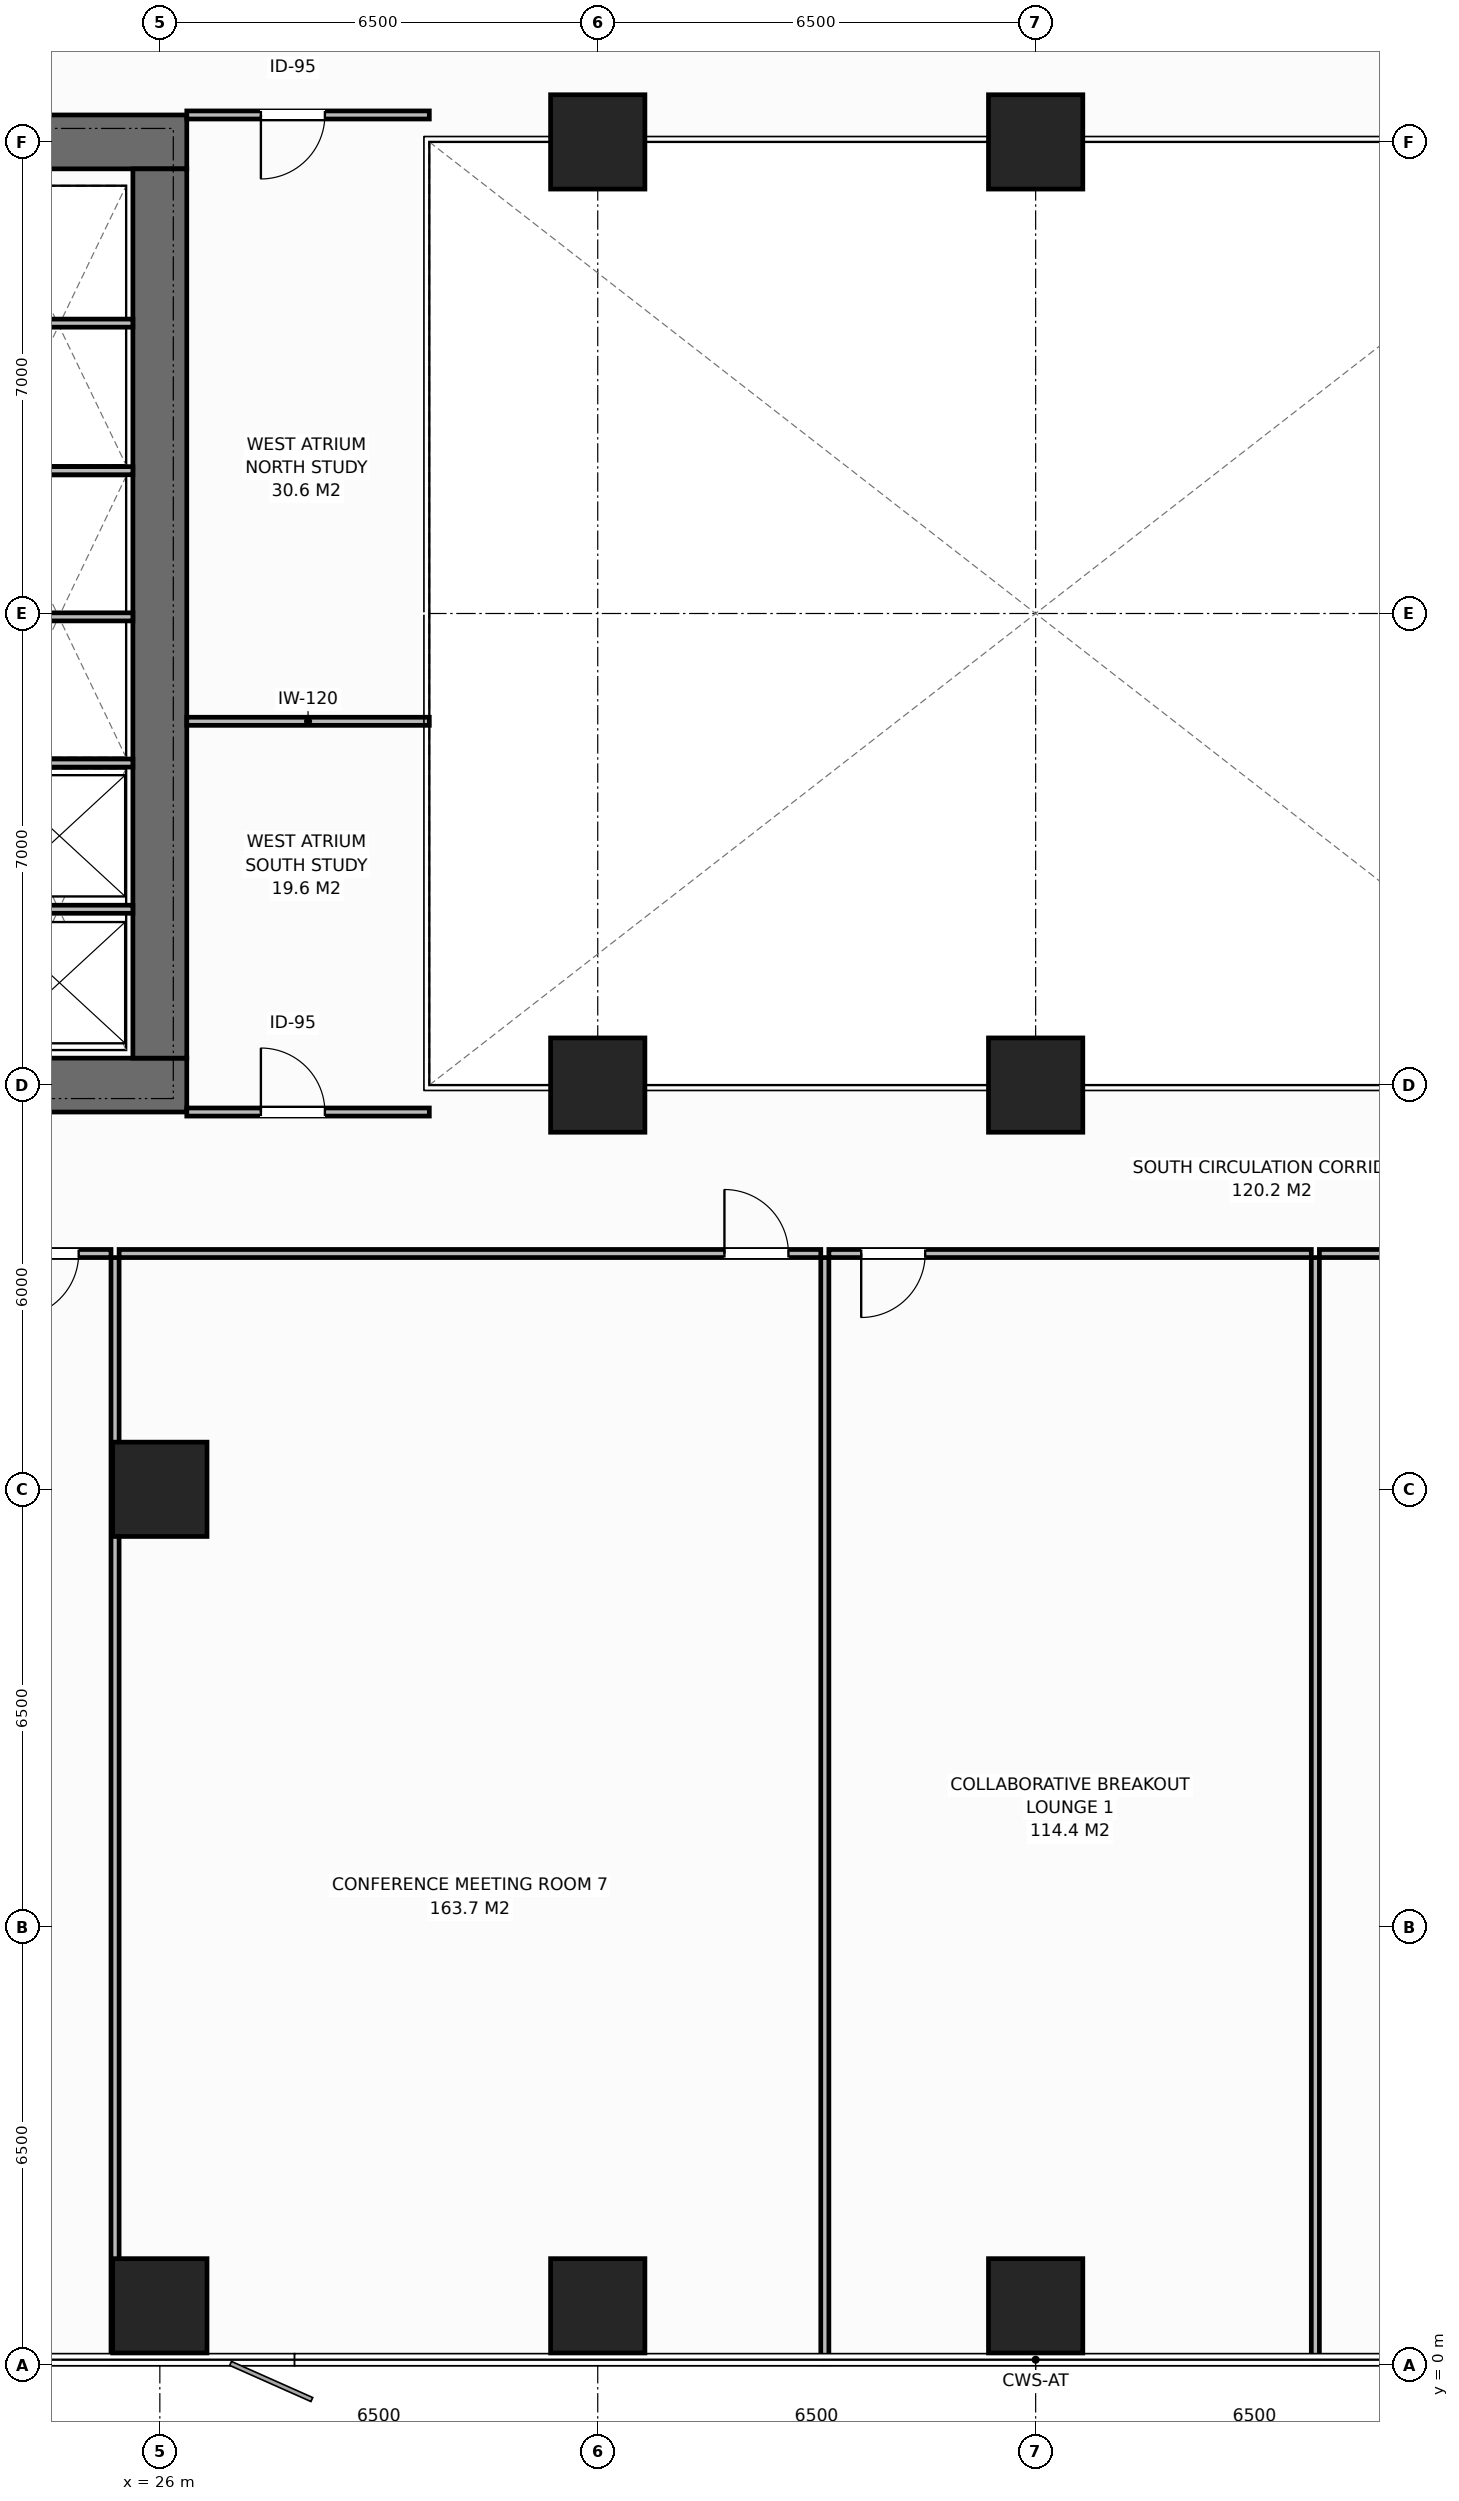
"""IFC4 building model, lengths in metres.
Left out: names, types, materials, properties, quantities, classifications, styles, units other than length and angle.
Written with IfcOpenShell. Run it as: python <this file> out.ifc"""

import sys

from ifc_helpers import new_model, si_unit, direction, frame, frame_2d, origin, origin_2d, place, context, subcontext, project, spatial, rectangle, extrude, element, fill, save


model = new_model("IFC4")
c1 = context("Model", 3, precision=1e-05, world=origin(), true_north=direction((0.0, 1.0)))
c2 = subcontext(c1, "Body", "Model", "MODEL_VIEW")
j1 = project(units=[si_unit("LENGTHUNIT", "METRE"), si_unit("PLANEANGLEUNIT", "RADIAN")], contexts=[c1])
p1 = place(None, origin())
s1 = spatial("IfcSite", under=j1, at=p1, CompositionType="ELEMENT")
p2 = place(p1, origin())
s2 = spatial("IfcBuilding", under=s1, at=p2, CompositionType="ELEMENT")
p3 = place(p2, frame((0.0, 0.0, 77.2)))
s3 = spatial("IfcBuildingStorey", under=s2, at=p3, CompositionType="ELEMENT", Elevation=77.2)
p4 = place(p3, frame((12.6, 19.0, 0.0), z_axis=(0.0, 0.0, 1.0), x_axis=(1.0, 0.0, 0.0)))
e1 = element("IfcWall", 1, at=p4, inside=s3, PredefinedType="SHEAR", context=c2, shape_type="SweptSolid", body=[
    extrude(rectangle(XDim=13.8, YDim=0.8, at=frame_2d((6.9, 0.0))), origin(), (0.0, 0.0, 1.0), 3.8),
])
p5 = place(p4, frame((9.28, 0.0, 0.0)))
e2 = element("IfcOpeningElement", 2, at=p5, cuts=e1, PredefinedType="OPENING", context=c2, shape_type="SweptSolid", body=[
    extrude(rectangle(XDim=1.4, YDim=2.2, at=frame_2d((0.7, 1.1))), frame((0.0, 0.41, 0.0), z_axis=(0.0, -1.0, 0.0), x_axis=(1.0, 0.0, 0.0)), (0.0, 0.0, 1.0), 0.82),
])
p6 = place(p3, frame((12.6, 33.0, 0.0), z_axis=(0.0, 0.0, 1.0), x_axis=(1.0, 0.0, 0.0)))
e3 = element("IfcWall", 3, at=p6, inside=s3, PredefinedType="SHEAR", context=c2, shape_type="SweptSolid", body=[
    extrude(rectangle(XDim=13.8, YDim=0.8, at=frame_2d((6.9, 0.0))), origin(), (0.0, 0.0, 1.0), 3.8),
])
p7 = place(p6, frame((1.3, 0.0, 0.0)))
e4 = element("IfcOpeningElement", 4, at=p7, cuts=e3, PredefinedType="OPENING", context=c2, shape_type="SweptSolid", body=[
    extrude(rectangle(XDim=0.9, YDim=2.15, at=frame_2d((0.45, 1.075))), frame((0.0, 0.41, 0.0), z_axis=(0.0, -1.0, 0.0), x_axis=(1.0, 0.0, 0.0)), (0.0, 0.0, 1.0), 0.82),
])
p8 = place(p6, frame((3.2, 0.0, 0.0)))
e5 = element("IfcOpeningElement", 5, at=p8, cuts=e3, PredefinedType="OPENING", context=c2, shape_type="SweptSolid", body=[
    extrude(rectangle(XDim=0.9, YDim=2.15, at=frame_2d((0.45, 1.075))), frame((0.0, 0.41, 0.0), z_axis=(0.0, -1.0, 0.0), x_axis=(1.0, 0.0, 0.0)), (0.0, 0.0, 1.0), 0.82),
])
p9 = place(p6, frame((5.0, 0.0, 0.0)))
e6 = element("IfcOpeningElement", 6, at=p9, cuts=e3, PredefinedType="OPENING", context=c2, shape_type="SweptSolid", body=[
    extrude(rectangle(XDim=0.9, YDim=2.15, at=frame_2d((0.45, 1.075))), frame((0.0, 0.41, 0.0), z_axis=(0.0, -1.0, 0.0), x_axis=(1.0, 0.0, 0.0)), (0.0, 0.0, 1.0), 0.82),
])
p10 = place(p6, frame((6.9, 0.0, 0.0)))
e7 = element("IfcOpeningElement", 7, at=p10, cuts=e3, PredefinedType="OPENING", context=c2, shape_type="SweptSolid", body=[
    extrude(rectangle(XDim=0.9, YDim=2.15, at=frame_2d((0.45, 1.075))), frame((0.0, 0.41, 0.0), z_axis=(0.0, -1.0, 0.0), x_axis=(1.0, 0.0, 0.0)), (0.0, 0.0, 1.0), 0.82),
])
p11 = place(p6, frame((9.28, 0.0, 0.0)))
e8 = element("IfcOpeningElement", 8, at=p11, cuts=e3, PredefinedType="OPENING", context=c2, shape_type="SweptSolid", body=[
    extrude(rectangle(XDim=1.4, YDim=2.2, at=frame_2d((0.7, 1.1))), frame((0.0, 0.41, 0.0), z_axis=(0.0, -1.0, 0.0), x_axis=(1.0, 0.0, 0.0)), (0.0, 0.0, 1.0), 0.82),
])
p12 = place(p3, frame((26.0, 19.4, 0.0), z_axis=(0.0, 0.0, 1.0), x_axis=(0.0, 1.0, 0.0)))
e9 = element("IfcWall", 9, at=p12, inside=s3, PredefinedType="SHEAR", context=c2, shape_type="SweptSolid", body=[
    extrude(rectangle(XDim=13.2, YDim=0.8, at=frame_2d((6.6, 0.0))), origin(), (0.0, 0.0, 1.0), 3.8),
])
for number, where, z_axis, x_axis in (
    (10, (32.5, 19.0, 0.0), (0.0, 0.0, 1.0), (1.0, 0.0, 0.0)),
    (11, (32.5, 33.0, 0.0), (0.0, 0.0, 1.0), (1.0, 0.0, 0.0)),
    (12, (39.0, 19.0, 0.0), (0.0, 0.0, 1.0), (1.0, 0.0, 0.0)),
    (13, (39.0, 33.0, 0.0), (0.0, 0.0, 1.0), (1.0, 0.0, 0.0)),
    (14, (26.0, 13.0, 0.0), (0.0, 0.0, 1.0), (1.0, 0.0, 0.0)),
    (15, (26.0, 0.88, 0.0), (0.0, 0.0, 1.0), (1.0, 0.0, 0.0)),
    (16, (32.5, 0.88, 0.0), (0.0, 0.0, 1.0), (1.0, 0.0, 0.0)),
    (17, (39.0, 0.88, 0.0), (0.0, 0.0, 1.0), (1.0, 0.0, 0.0)),
):
    element("IfcColumn", number, at=place(p3, frame(where, z_axis=z_axis, x_axis=x_axis)), inside=s3, PredefinedType="COLUMN", context=c2, shape_type="SweptSolid", body=[
        extrude(rectangle(XDim=1.4, YDim=1.4, at=origin_2d()), origin(), (0.0, 0.0, 1.0), 3.8),
    ])
for number, where, z_axis, x_axis in (
    (18, (23.4, 21.61, 0.0), (0.0, 0.0, 1.0), (1.0, 0.0, 0.0)),
    (19, (23.4, 23.78, 0.0), (0.0, 0.0, 1.0), (1.0, 0.0, 0.0)),
    (20, (23.4, 25.95, 0.0), (0.0, 0.0, 1.0), (1.0, 0.0, 0.0)),
    (21, (23.4, 28.12, 0.0), (0.0, 0.0, 1.0), (1.0, 0.0, 0.0)),
    (22, (23.4, 30.31, 0.0), (0.0, 0.0, 1.0), (1.0, 0.0, 0.0)),
):
    element("IfcWall", number, at=place(p3, frame(where, z_axis=z_axis, x_axis=x_axis)), inside=s3, PredefinedType="PARTITIONING", context=c2, shape_type="SweptSolid", body=[
        extrude(rectangle(XDim=2.2, YDim=0.12, at=frame_2d((1.1, 0.0))), origin(), (0.0, 0.0, 1.0), 3.52),
    ])
p13 = place(p3, frame((26.4, 24.4, 0.0), z_axis=(0.0, 0.0, 1.0), x_axis=(1.0, 0.0, 0.0)))
e23 = element("IfcWall", 23, at=p13, inside=s3, PredefinedType="PARTITIONING", context=c2, shape_type="SweptSolid", body=[
    extrude(rectangle(XDim=3.6, YDim=0.12, at=frame_2d((1.8, 0.0))), origin(), (0.0, 0.0, 1.0), 3.52),
])
p14 = place(p3, frame((26.4, 18.6, 0.0), z_axis=(0.0, 0.0, 1.0), x_axis=(1.0, 0.0, 0.0)))
e24 = element("IfcWall", 24, at=p14, inside=s3, PredefinedType="PARTITIONING", context=c2, shape_type="SweptSolid", body=[
    extrude(rectangle(XDim=3.6, YDim=0.12, at=frame_2d((1.8, 0.0))), origin(), (0.0, 0.0, 1.0), 3.52),
])
p15 = place(p14, frame((1.1, 0.0, 0.0)))
e25 = element("IfcOpeningElement", 25, at=p15, cuts=e24, PredefinedType="OPENING", context=c2, shape_type="SweptSolid", body=[
    extrude(rectangle(XDim=0.95, YDim=2.15, at=frame_2d((0.475, 1.075))), frame((0.0, 0.07, 0.0), z_axis=(0.0, -1.0, 0.0), x_axis=(1.0, 0.0, 0.0)), (0.0, 0.0, 1.0), 0.14),
])
p16 = place(p3, frame((26.4, 33.4, 0.0), z_axis=(0.0, 0.0, 1.0), x_axis=(1.0, 0.0, 0.0)))
e26 = element("IfcWall", 26, at=p16, inside=s3, PredefinedType="PARTITIONING", context=c2, shape_type="SweptSolid", body=[
    extrude(rectangle(XDim=3.6, YDim=0.12, at=frame_2d((1.8, 0.0))), origin(), (0.0, 0.0, 1.0), 3.52),
])
p17 = place(p16, frame((1.1, 0.0, 0.0)))
e27 = element("IfcOpeningElement", 27, at=p17, cuts=e26, PredefinedType="OPENING", context=c2, shape_type="SweptSolid", body=[
    extrude(rectangle(XDim=0.95, YDim=2.15, at=frame_2d((0.475, 1.075))), frame((0.0, 0.07, 0.0), z_axis=(0.0, -1.0, 0.0), x_axis=(1.0, 0.0, 0.0)), (0.0, 0.0, 1.0), 0.14),
])
p18 = place(p3, frame((25.335, 0.02, 0.0), z_axis=(0.0, 0.0, 1.0), x_axis=(0.0, 1.0, 0.0)))
e28 = element("IfcWall", 28, at=p18, inside=s3, PredefinedType="PARTITIONING", context=c2, shape_type="SweptSolid", body=[
    extrude(rectangle(XDim=16.42, YDim=0.12, at=frame_2d((8.21, 0.0))), origin(), (0.0, 0.0, 1.0), 3.52),
])
p19 = place(p3, frame((11.605, 16.5, 0.0), z_axis=(0.0, 0.0, 1.0), x_axis=(1.0, 0.0, 0.0)))
e29 = element("IfcWall", 29, at=p19, inside=s3, PredefinedType="PARTITIONING", context=c2, shape_type="SweptSolid", body=[
    extrude(rectangle(XDim=13.67, YDim=0.12, at=frame_2d((6.835, 0.0))), origin(), (0.0, 0.0, 1.0), 3.52),
])
p20 = place(p19, frame((12.24, 0.0, 0.0)))
e30 = element("IfcOpeningElement", 30, at=p20, cuts=e29, PredefinedType="OPENING", context=c2, shape_type="SweptSolid", body=[
    extrude(rectangle(XDim=0.95, YDim=2.15, at=frame_2d((0.475, 1.075))), frame((0.0, 0.07, 0.0), z_axis=(0.0, -1.0, 0.0), x_axis=(1.0, 0.0, 0.0)), (0.0, 0.0, 1.0), 0.14),
])
p21 = place(p3, frame((35.871, 0.02, 0.0), z_axis=(0.0, 0.0, 1.0), x_axis=(0.0, 1.0, 0.0)))
e31 = element("IfcWall", 31, at=p21, inside=s3, PredefinedType="PARTITIONING", context=c2, shape_type="SweptSolid", body=[
    extrude(rectangle(XDim=16.42, YDim=0.12, at=frame_2d((8.21, 0.0))), origin(), (0.0, 0.0, 1.0), 3.52),
])
p22 = place(p3, frame((25.395, 16.5, 0.0), z_axis=(0.0, 0.0, 1.0), x_axis=(1.0, 0.0, 0.0)))
e32 = element("IfcWall", 32, at=p22, inside=s3, PredefinedType="PARTITIONING", context=c2, shape_type="SweptSolid", body=[
    extrude(rectangle(XDim=10.415, YDim=0.12, at=frame_2d((5.208, 0.0))), origin(), (0.0, 0.0, 1.0), 3.52),
])
p23 = place(p22, frame((8.985, 0.0, 0.0)))
e33 = element("IfcOpeningElement", 33, at=p23, cuts=e32, PredefinedType="OPENING", context=c2, shape_type="SweptSolid", body=[
    extrude(rectangle(XDim=0.95, YDim=2.15, at=frame_2d((0.475, 1.075))), frame((0.0, 0.07, 0.0), z_axis=(0.0, -1.0, 0.0), x_axis=(1.0, 0.0, 0.0)), (0.0, 0.0, 1.0), 0.14),
])
p24 = place(p3, frame((43.152, 0.02, 0.0), z_axis=(0.0, 0.0, 1.0), x_axis=(0.0, 1.0, 0.0)))
e34 = element("IfcWall", 34, at=p24, inside=s3, PredefinedType="PARTITIONING", context=c2, shape_type="SweptSolid", body=[
    extrude(rectangle(XDim=16.42, YDim=0.12, at=frame_2d((8.21, 0.0))), origin(), (0.0, 0.0, 1.0), 3.52),
])
p25 = place(p3, frame((35.931, 16.5, 0.0), z_axis=(0.0, 0.0, 1.0), x_axis=(1.0, 0.0, 0.0)))
e35 = element("IfcWall", 35, at=p25, inside=s3, PredefinedType="PARTITIONING", context=c2, shape_type="SweptSolid", body=[
    extrude(rectangle(XDim=7.161, YDim=0.12, at=frame_2d((3.581, 0.0))), origin(), (0.0, 0.0, 1.0), 3.52),
])
p26 = place(p25, frame((0.48, 0.0, 0.0)))
e36 = element("IfcOpeningElement", 36, at=p26, cuts=e35, PredefinedType="OPENING", context=c2, shape_type="SweptSolid", body=[
    extrude(rectangle(XDim=0.95, YDim=2.15, at=frame_2d((0.475, 1.075))), frame((0.0, 0.07, 0.0), z_axis=(0.0, -1.0, 0.0), x_axis=(1.0, 0.0, 0.0)), (0.0, 0.0, 1.0), 0.14),
])
p27 = place(p3, frame((43.212, 16.5, 0.0), z_axis=(0.0, 0.0, 1.0), x_axis=(1.0, 0.0, 0.0)))
e37 = element("IfcWall", 37, at=p27, inside=s3, PredefinedType="PARTITIONING", context=c2, shape_type="SweptSolid", body=[
    extrude(rectangle(XDim=12.047, YDim=0.12, at=frame_2d((6.023, 0.0))), origin(), (0.0, 0.0, 1.0), 3.52),
])
p28 = place(p27, frame((5.548, 0.0, 0.0)))
e38 = element("IfcOpeningElement", 38, at=p28, cuts=e37, PredefinedType="OPENING", context=c2, shape_type="SweptSolid", body=[
    extrude(rectangle(XDim=0.95, YDim=2.15, at=frame_2d((0.475, 1.075))), frame((0.0, 0.07, 0.0), z_axis=(0.0, -1.0, 0.0), x_axis=(1.0, 0.0, 0.0)), (0.0, 0.0, 1.0), 0.14),
])
p29 = place(p15, origin())
e39 = element("IfcDoor", 39, at=p29, inside=s3, OperationType="SINGLE_SWING_LEFT", PredefinedType="DOOR", context=c2, shape_type="SweptSolid", body=[
    extrude(rectangle(XDim=0.95, YDim=2.15, at=frame_2d((0.475, 1.075))), frame((0.0, 0.025, 0.0), z_axis=(0.0, -1.0, 0.0), x_axis=(1.0, 0.0, 0.0)), (0.0, 0.0, 1.0), 0.05),
])
fill(e25, e39)
p30 = place(p17, origin())
e40 = element("IfcDoor", 40, at=p30, inside=s3, OperationType="SINGLE_SWING_RIGHT", PredefinedType="DOOR", context=c2, shape_type="SweptSolid", body=[
    extrude(rectangle(XDim=0.95, YDim=2.15, at=frame_2d((0.475, 1.075))), frame((0.0, 0.025, 0.0), z_axis=(0.0, -1.0, 0.0), x_axis=(1.0, 0.0, 0.0)), (0.0, 0.0, 1.0), 0.05),
])
fill(e27, e40)
p31 = place(p20, origin())
e41 = element("IfcDoor", 41, at=p31, inside=s3, OperationType="SINGLE_SWING_RIGHT", PredefinedType="DOOR", context=c2, shape_type="SweptSolid", body=[
    extrude(rectangle(XDim=0.95, YDim=2.15, at=frame_2d((0.475, 1.075))), frame((0.0, 0.025, 0.0), z_axis=(0.0, -1.0, 0.0), x_axis=(1.0, 0.0, 0.0)), (0.0, 0.0, 1.0), 0.05),
])
fill(e30, e41)
p32 = place(p23, origin())
e42 = element("IfcDoor", 42, at=p32, inside=s3, OperationType="SINGLE_SWING_LEFT", PredefinedType="DOOR", context=c2, shape_type="SweptSolid", body=[
    extrude(rectangle(XDim=0.95, YDim=2.15, at=frame_2d((0.475, 1.075))), frame((0.0, 0.025, 0.0), z_axis=(0.0, -1.0, 0.0), x_axis=(1.0, 0.0, 0.0)), (0.0, 0.0, 1.0), 0.05),
])
fill(e33, e42)
p33 = place(p26, origin())
e43 = element("IfcDoor", 43, at=p33, inside=s3, OperationType="SINGLE_SWING_RIGHT", PredefinedType="DOOR", context=c2, shape_type="SweptSolid", body=[
    extrude(rectangle(XDim=0.95, YDim=2.15, at=frame_2d((0.475, 1.075))), frame((0.0, 0.025, 0.0), z_axis=(0.0, -1.0, 0.0), x_axis=(1.0, 0.0, 0.0)), (0.0, 0.0, 1.0), 0.05),
])
fill(e36, e43)
save(model, sys.argv[1])
